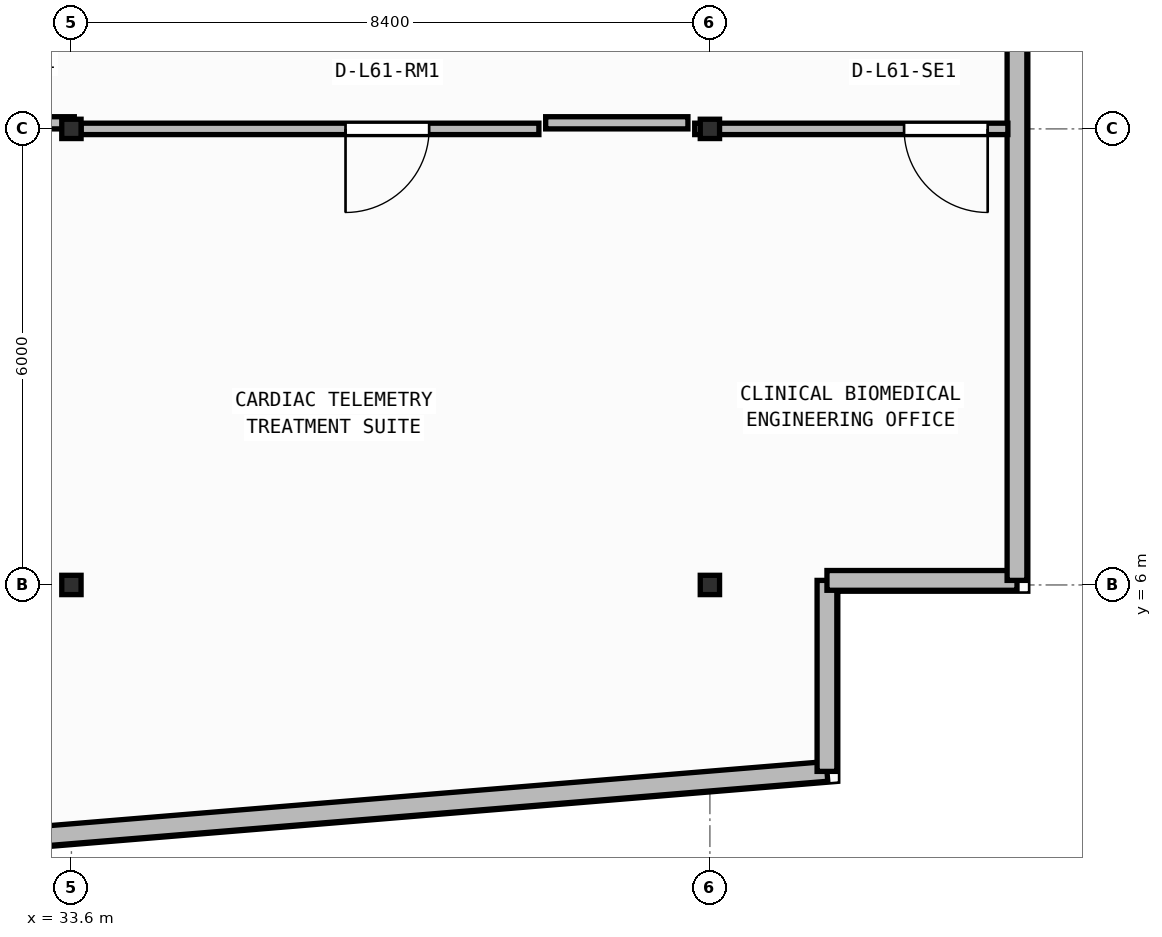
"""IFC4 building model, lengths in metres.
Left out: names, types, materials, properties, quantities, classifications, styles, units other than length and angle.
Written with IfcOpenShell. Run it as: python <this file> out.ifc"""

import sys

from ifc_helpers import new_model, si_unit, direction, frame, frame_2d, origin, origin_2d, place, context, subcontext, project, spatial, rectangle, i_section, extrude, element, fill, save


model = new_model("IFC4")
c1 = context("Model", 3, precision=1e-05, world=origin(), true_north=direction((0.0, 1.0)))
c2 = subcontext(c1, "Body", "Model", "MODEL_VIEW")
j1 = project(units=[si_unit("LENGTHUNIT", "METRE"), si_unit("PLANEANGLEUNIT", "RADIAN")], contexts=[c1])
p1 = place(None, origin())
s1 = spatial("IfcSite", under=j1, at=p1, CompositionType="ELEMENT")
p2 = place(p1, origin())
s2 = spatial("IfcBuilding", under=s1, at=p2, CompositionType="ELEMENT")
p3 = place(p2, frame((0.0, 0.0, 248.65)))
s3 = spatial("IfcBuildingStorey", under=s2, at=p3, CompositionType="ELEMENT", Elevation=248.65)
for number, where, z_axis, x_axis in (
    (1, (33.6, 6.0, 0.0), (0.0, 0.0, 1.0), (1.0, 0.0, 0.0)),
    (2, (42.0, 6.0, 0.0), (0.0, 0.0, 1.0), (1.0, 0.0, 0.0)),
    (3, (33.6, 12.0, 0.0), (0.0, 0.0, 1.0), (1.0, 0.0, 0.0)),
    (4, (42.0, 12.0, 0.0), (0.0, 0.0, 1.0), (1.0, 0.0, 0.0)),
):
    element("IfcColumn", number, at=place(p3, frame(where, z_axis=z_axis, x_axis=x_axis)), inside=s3, PredefinedType="COLUMN", context=c2, shape_type="SweptSolid", body=[
        extrude(i_section(OverallWidth=0.254, OverallDepth=0.254, WebThickness=0.009, FlangeThickness=0.014, FilletRadius=0.013, at=origin_2d()), origin(), (0.0, 0.0, 1.0), 3.95),
    ])
p4 = place(p3, frame((2.66, 0.174, 0.0), z_axis=(0.0, 0.0, 1.0), x_axis=(0.996611813627, 0.082248969229, 0.0)))
e5 = element("IfcWall", 5, at=p4, inside=s3, PredefinedType="STANDARD", context=c2, shape_type="SweptSolid", body=[
    extrude(rectangle(XDim=41.019, YDim=0.26, at=frame_2d((20.51, 0.0))), origin(), (0.0, 0.0, 1.0), 3.71),
])
p5 = place(p4, frame((19.31, 0.0, 0.9)))
e6 = element("IfcOpeningElement", 6, at=p5, cuts=e5, PredefinedType="OPENING", context=c2, shape_type="SweptSolid", body=[
    extrude(rectangle(XDim=2.4, YDim=1.65, at=frame_2d((1.2, 0.825))), frame((0.0, 0.14, 0.0), z_axis=(0.0, -1.0, 0.0), x_axis=(1.0, 0.0, 0.0)), (0.0, 0.0, 1.0), 0.28),
])
p6 = place(p3, frame((43.54, 3.547, 0.0), z_axis=(0.0, 0.0, 1.0), x_axis=(0.0, 1.0, 0.0)))
e7 = element("IfcWall", 7, at=p6, inside=s3, PredefinedType="STANDARD", context=c2, shape_type="SweptSolid", body=[
    extrude(rectangle(XDim=2.513, YDim=0.26, at=frame_2d((1.256, 0.0))), origin(), (0.0, 0.0, 1.0), 3.71),
])
p7 = place(p3, frame((43.54, 6.06, 0.0), z_axis=(0.0, 0.0, 1.0), x_axis=(1.0, 0.0, 0.0)))
e8 = element("IfcWall", 8, at=p7, inside=s3, PredefinedType="STANDARD", context=c2, shape_type="SweptSolid", body=[
    extrude(rectangle(XDim=2.5, YDim=0.26, at=frame_2d((1.25, 0.0))), origin(), (0.0, 0.0, 1.0), 3.71),
])
p8 = place(p3, frame((46.04, 6.06, 0.0), z_axis=(0.0, 0.0, 1.0), x_axis=(0.0, 1.0, 0.0)))
e9 = element("IfcWall", 9, at=p8, inside=s3, PredefinedType="STANDARD", context=c2, shape_type="SweptSolid", body=[
    extrude(rectangle(XDim=21.88, YDim=0.26, at=frame_2d((10.94, 0.0))), origin(), (0.0, 0.0, 1.0), 3.71),
])
p9 = place(p8, frame((10.29, 0.0, 0.0)))
e10 = element("IfcOpeningElement", 10, at=p9, cuts=e9, PredefinedType="OPENING", context=c2, shape_type="SweptSolid", body=[
    extrude(rectangle(XDim=1.3, YDim=2.15, at=frame_2d((0.65, 1.075))), frame((0.0, 0.14, 0.0), z_axis=(0.0, -1.0, 0.0), x_axis=(1.0, 0.0, 0.0)), (0.0, 0.0, 1.0), 0.28),
])
p10 = place(p3, frame((39.75, 12.0, 0.0), z_axis=(0.0, 0.0, 1.0), x_axis=(-1.0, 0.0, 0.0)))
e11 = element("IfcWall", 11, at=p10, inside=s3, PredefinedType="PARTITIONING", context=c2, shape_type="SweptSolid", body=[
    extrude(rectangle(XDim=6.023, YDim=0.15, at=frame_2d((3.011, 0.0))), origin(), (0.0, 0.0, 1.0), 3.157),
])
p11 = place(p10, frame((1.444, 0.0, 0.0)))
e12 = element("IfcOpeningElement", 12, at=p11, cuts=e11, PredefinedType="OPENING", context=c2, shape_type="SweptSolid", body=[
    extrude(rectangle(XDim=1.1, YDim=2.1, at=frame_2d((0.55, 1.05))), frame((0.0, 0.085, 0.0), z_axis=(0.0, -1.0, 0.0), x_axis=(1.0, 0.0, 0.0)), (0.0, 0.0, 1.0), 0.17),
])
p12 = place(p3, frame((45.92, 12.0, 0.0), z_axis=(0.0, 0.0, 1.0), x_axis=(-1.0, 0.0, 0.0)))
e13 = element("IfcWall", 13, at=p12, inside=s3, PredefinedType="PARTITIONING", context=c2, shape_type="SweptSolid", body=[
    extrude(rectangle(XDim=4.12, YDim=0.15, at=frame_2d((2.06, 0.0))), origin(), (0.0, 0.0, 1.0), 3.157),
])
p13 = place(p12, frame((0.265, 0.0, 0.0)))
e14 = element("IfcOpeningElement", 14, at=p13, cuts=e13, PredefinedType="OPENING", context=c2, shape_type="SweptSolid", body=[
    extrude(rectangle(XDim=1.1, YDim=2.1, at=frame_2d((0.55, 1.05))), frame((0.0, 0.085, 0.0), z_axis=(0.0, -1.0, 0.0), x_axis=(1.0, 0.0, 0.0)), (0.0, 0.0, 1.0), 0.17),
])
p14 = place(p3, frame((31.439, 12.08, 0.0), z_axis=(0.0, 0.0, 1.0), x_axis=(1.0, 0.0, 0.0)))
e15 = element("IfcWall", 15, at=p14, inside=s3, PredefinedType="PARTITIONING", context=c2, shape_type="SweptSolid", body=[
    extrude(rectangle(XDim=2.198, YDim=0.16, at=frame_2d((1.099, 0.0))), origin(), (0.0, 0.0, 1.0), 3.157),
])
p15 = place(p3, frame((39.839, 12.08, 0.0), z_axis=(0.0, 0.0, 1.0), x_axis=(1.0, 0.0, 0.0)))
e16 = element("IfcWall", 16, at=p15, inside=s3, PredefinedType="PARTITIONING", context=c2, shape_type="SweptSolid", body=[
    extrude(rectangle(XDim=1.871, YDim=0.16, at=frame_2d((0.936, 0.0))), origin(), (0.0, 0.0, 1.0), 3.157),
])
p16 = place(p11, origin())
e17 = element("IfcDoor", 17, at=p16, inside=s3, OperationType="SINGLE_SWING_RIGHT", PredefinedType="DOOR", context=c2, shape_type="SweptSolid", body=[
    extrude(rectangle(XDim=1.1, YDim=2.1, at=frame_2d((0.55, 1.05))), frame((0.0, 0.025, 0.0), z_axis=(0.0, -1.0, 0.0), x_axis=(1.0, 0.0, 0.0)), (0.0, 0.0, 1.0), 0.05),
])
fill(e12, e17)
p17 = place(p13, origin())
e18 = element("IfcDoor", 18, at=p17, inside=s3, OperationType="SINGLE_SWING_LEFT", PredefinedType="DOOR", context=c2, shape_type="SweptSolid", body=[
    extrude(rectangle(XDim=1.1, YDim=2.1, at=frame_2d((0.55, 1.05))), frame((0.0, 0.025, 0.0), z_axis=(0.0, -1.0, 0.0), x_axis=(1.0, 0.0, 0.0)), (0.0, 0.0, 1.0), 0.05),
])
fill(e14, e18)
save(model, sys.argv[1])
